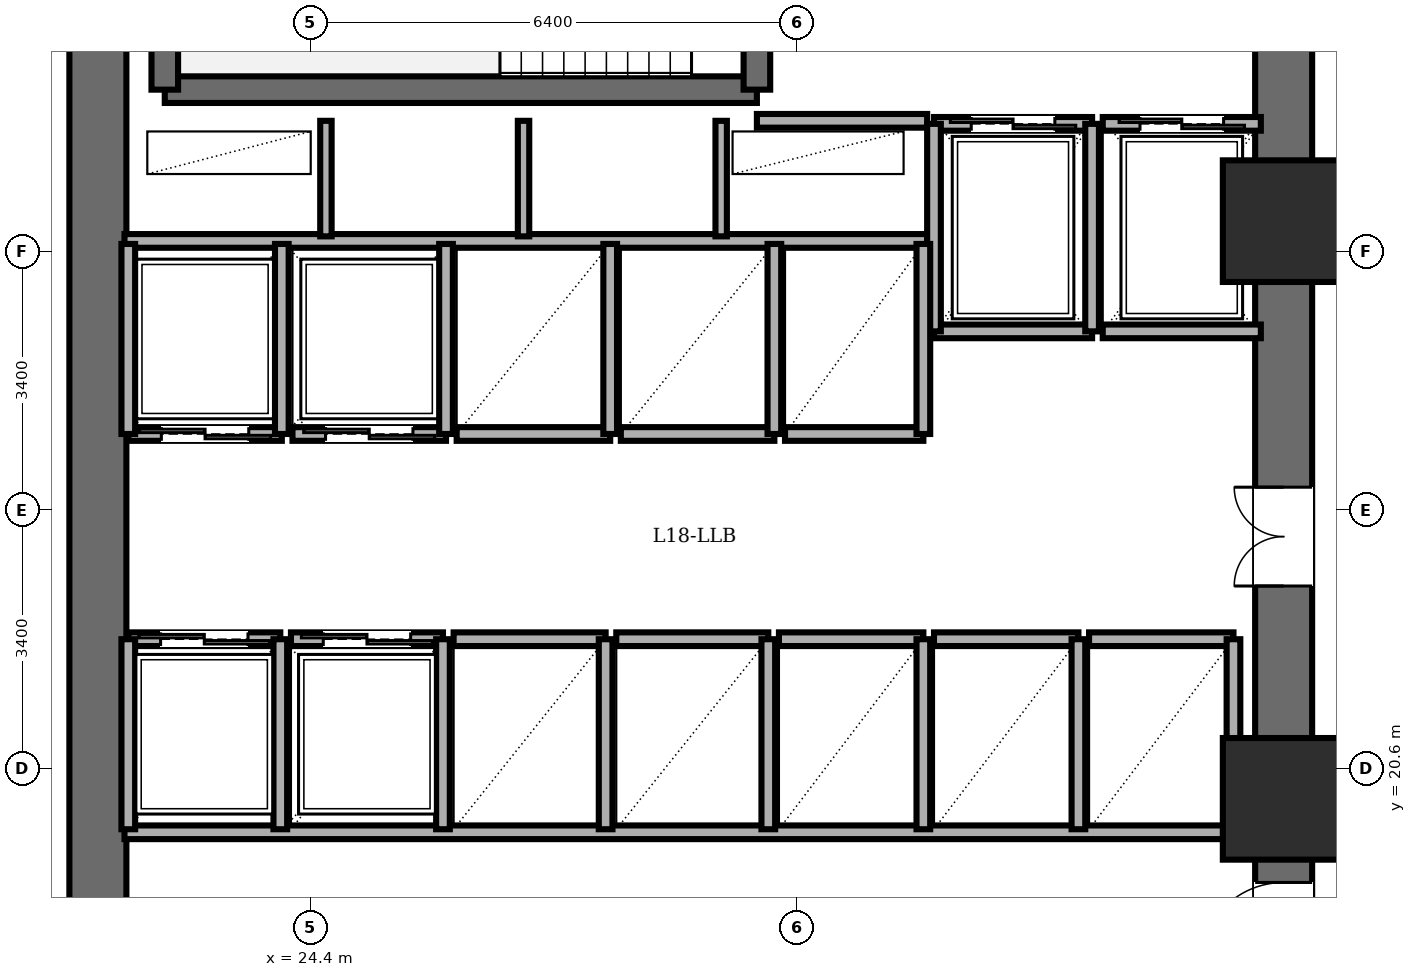
"""IFC4 building model, lengths in metres.
Left out: names, types, materials, properties, quantities, classifications, styles, units other than length and angle.
Written with IfcOpenShell. Run it as: python <this file> out.ifc"""

import sys

from ifc_helpers import new_model, si_unit, direction, frame, frame_2d, origin, origin_2d, place, context, subcontext, project, spatial, rectangle, extrude, element, fill, save


model = new_model("IFC4")
c1 = context("Model", 3, precision=1e-05, world=origin(), true_north=direction((0.0, 1.0)))
c2 = subcontext(c1, "Body", "Model", "MODEL_VIEW")
j1 = project(units=[si_unit("LENGTHUNIT", "METRE"), si_unit("PLANEANGLEUNIT", "RADIAN")], contexts=[c1])
p1 = place(None, origin())
s1 = spatial("IfcSite", under=j1, at=p1, CompositionType="ELEMENT")
p2 = place(p1, origin())
s2 = spatial("IfcBuilding", under=s1, at=p2, CompositionType="ELEMENT")
p3 = place(p2, frame((0.0, 0.0, 68.4)))
s3 = spatial("IfcBuildingStorey", under=s2, at=p3, CompositionType="ELEMENT", Elevation=68.4)
for number, where, z_axis, x_axis in (
    (1, (37.2, 20.2, 0.0), (0.0, 0.0, 1.0), (1.0, 0.0, 0.0)),
    (2, (37.2, 27.8, 0.0), (0.0, 0.0, 1.0), (1.0, 0.0, 0.0)),
):
    element("IfcColumn", number, at=place(p3, frame(where, z_axis=z_axis, x_axis=x_axis)), inside=s3, PredefinedType="COLUMN", context=c2, shape_type="SweptSolid", body=[
        extrude(rectangle(XDim=1.6, YDim=1.6, at=origin_2d()), origin(), (0.0, 0.0, 1.0), 3.6),
    ])
p4 = place(p3, frame((21.6, 14.4, 0.0), z_axis=(0.0, 0.0, 1.0), x_axis=(0.0, 1.0, 0.0)))
e3 = element("IfcWall", 3, at=p4, inside=s3, PredefinedType="SHEAR", context=c2, shape_type="SweptSolid", body=[
    extrude(rectangle(XDim=19.2, YDim=0.75, at=frame_2d((9.6, 0.0))), origin(), (0.0, 0.0, 1.0), 3.4),
])
p5 = place(p3, frame((37.2, 14.4, 0.0), z_axis=(0.0, 0.0, 1.0), x_axis=(0.0, 1.0, 0.0)))
e4 = element("IfcWall", 4, at=p5, inside=s3, PredefinedType="SHEAR", context=c2, shape_type="SweptSolid", body=[
    extrude(rectangle(XDim=19.2, YDim=0.75, at=frame_2d((9.6, 0.0))), origin(), (0.0, 0.0, 1.0), 3.4),
])
p6 = place(p5, frame((15.8, 0.0, 0.0)))
e5 = element("IfcOpeningElement", 5, at=p6, cuts=e4, PredefinedType="OPENING", context=c2, shape_type="SweptSolid", body=[
    extrude(rectangle(XDim=1.15, YDim=2.15, at=frame_2d((0.575, 1.075))), frame((0.0, 0.385, 0.0), z_axis=(0.0, -1.0, 0.0), x_axis=(1.0, 0.0, 0.0)), (0.0, 0.0, 1.0), 0.77),
])
p7 = place(p5, frame((3.6, 0.0, 0.0)))
e6 = element("IfcOpeningElement", 6, at=p7, cuts=e4, PredefinedType="OPENING", context=c2, shape_type="SweptSolid", body=[
    extrude(rectangle(XDim=1.1, YDim=2.15, at=frame_2d((0.55, 1.075))), frame((0.0, 0.385, 0.0), z_axis=(0.0, -1.0, 0.0), x_axis=(1.0, 0.0, 0.0)), (0.0, 0.0, 1.0), 0.77),
])
p8 = place(p5, frame((8.6, 0.0, 0.0)))
e7 = element("IfcOpeningElement", 7, at=p8, cuts=e4, PredefinedType="OPENING", context=c2, shape_type="SweptSolid", body=[
    extrude(rectangle(XDim=1.3, YDim=2.2, at=frame_2d((0.65, 1.1))), frame((0.0, 0.385, 0.0), z_axis=(0.0, -1.0, 0.0), x_axis=(1.0, 0.0, 0.0)), (0.0, 0.0, 1.0), 0.77),
])
p9 = place(p3, frame((22.48, 29.53, 0.0), z_axis=(0.0, 0.0, 1.0), x_axis=(1.0, 0.0, 0.0)))
e8 = element("IfcWall", 8, at=p9, inside=s3, PredefinedType="SOLIDWALL", context=c2, shape_type="SweptSolid", body=[
    extrude(rectangle(XDim=7.79, YDim=0.35, at=frame_2d((3.895, 0.0))), origin(), (0.0, 0.0, 1.0), 3.4),
])
p10 = place(p3, frame((22.48, 29.53, 0.0), z_axis=(0.0, 0.0, 1.0), x_axis=(0.0, 1.0, 0.0)))
e9 = element("IfcWall", 9, at=p10, inside=s3, PredefinedType="SOLIDWALL", context=c2, shape_type="SweptSolid", body=[
    extrude(rectangle(XDim=3.58, YDim=0.35, at=frame_2d((1.79, 0.0))), origin(), (0.0, 0.0, 1.0), 3.4),
])
p11 = place(p3, frame((30.27, 29.53, 0.0), z_axis=(0.0, 0.0, 1.0), x_axis=(0.0, 1.0, 0.0)))
e10 = element("IfcWall", 10, at=p11, inside=s3, PredefinedType="SOLIDWALL", context=c2, shape_type="SweptSolid", body=[
    extrude(rectangle(XDim=3.58, YDim=0.35, at=frame_2d((1.79, 0.0))), origin(), (0.0, 0.0, 1.0), 3.4),
])
p12 = place(p11, frame((1.25, 0.0, 0.0)))
e11 = element("IfcOpeningElement", 11, at=p12, cuts=e10, PredefinedType="OPENING", context=c2, shape_type="SweptSolid", body=[
    extrude(rectangle(XDim=1.1, YDim=2.15, at=frame_2d((0.55, 1.075))), frame((0.0, 0.185, 0.0), z_axis=(0.0, -1.0, 0.0), x_axis=(1.0, 0.0, 0.0)), (0.0, 0.0, 1.0), 0.37),
])
p13 = place(p3, frame((30.27, 29.12, 0.0), z_axis=(0.0, 0.0, 1.0), x_axis=(1.0, 0.0, 0.0)))
e12 = element("IfcWall", 12, at=p13, inside=s3, PredefinedType="PARTITIONING", context=c2, shape_type="SweptSolid", body=[
    extrude(rectangle(XDim=2.24, YDim=0.18, at=frame_2d((1.12, 0.0))), origin(), (0.0, 0.0, 1.0), 3.4),
])
p14 = place(p3, frame((21.95, 27.54, 0.0), z_axis=(0.0, 0.0, 1.0), x_axis=(1.0, 0.0, 0.0)))
e13 = element("IfcWall", 13, at=p14, inside=s3, PredefinedType="PARTITIONING", context=c2, shape_type="SweptSolid", body=[
    extrude(rectangle(XDim=10.56, YDim=0.18, at=frame_2d((5.28, 0.0))), origin(), (0.0, 0.0, 1.0), 3.4),
])
for number, where, z_axis, x_axis in (
    (14, (24.6, 27.6, 0.0), (0.0, 0.0, 1.0), (0.0, 1.0, 0.0)),
    (15, (27.2, 27.6, 0.0), (0.0, 0.0, 1.0), (0.0, 1.0, 0.0)),
    (16, (29.8, 27.6, 0.0), (0.0, 0.0, 1.0), (0.0, 1.0, 0.0)),
):
    element("IfcWall", number, at=place(p3, frame(where, z_axis=z_axis, x_axis=x_axis)), inside=s3, PredefinedType="PARTITIONING", context=c2, shape_type="SweptSolid", body=[
        extrude(rectangle(XDim=1.52, YDim=0.15, at=frame_2d((0.76, 0.0))), origin(), (0.0, 0.0, 1.0), 3.4),
    ])
p15 = place(p3, frame((21.95, 19.76, 0.0), z_axis=(0.0, 0.0, 1.0), x_axis=(1.0, 0.0, 0.0)))
e17 = element("IfcWall", 17, at=p15, inside=s3, PredefinedType="PARTITIONING", context=c2, shape_type="SweptSolid", body=[
    extrude(rectangle(XDim=14.87, YDim=0.18, at=frame_2d((7.435, 0.0))), origin(), (0.0, 0.0, 1.0), 3.4),
])
p16 = place(p3, frame((32.6, 29.08, 0.0), z_axis=(0.0, 0.0, 1.0), x_axis=(1.0, 0.0, 0.0)))
e18 = element("IfcWall", 18, at=p16, inside=s3, PredefinedType="PARTITIONING", context=c2, shape_type="SweptSolid", body=[
    extrude(rectangle(XDim=2.08, YDim=0.18, at=frame_2d((1.04, 0.0))), origin(), (0.0, 0.0, 1.0), 3.4),
])
p17 = place(p16, frame((0.49, 0.0, 0.0)))
e19 = element("IfcOpeningElement", 19, at=p17, cuts=e18, PredefinedType="OPENING", context=c2, shape_type="SweptSolid", body=[
    extrude(rectangle(XDim=1.1, YDim=2.2, at=frame_2d((0.55, 1.1))), frame((0.0, 0.1, 0.0), z_axis=(0.0, -1.0, 0.0), x_axis=(1.0, 0.0, 0.0)), (0.0, 0.0, 1.0), 0.2),
])
p18 = place(p3, frame((34.68, 26.35, 0.0), z_axis=(0.0, 0.0, 1.0), x_axis=(-1.0, 0.0, 0.0)))
e20 = element("IfcWall", 20, at=p18, inside=s3, PredefinedType="PARTITIONING", context=c2, shape_type="SweptSolid", body=[
    extrude(rectangle(XDim=2.08, YDim=0.18, at=frame_2d((1.04, 0.0))), origin(), (0.0, 0.0, 1.0), 3.4),
])
for number, where, z_axis, x_axis in (
    (21, (34.68, 26.35, 0.0), (0.0, 0.0, 1.0), (0.0, 1.0, 0.0)),
    (22, (32.6, 29.08, 0.0), (0.0, 0.0, 1.0), (0.0, -1.0, 0.0)),
):
    element("IfcWall", number, at=place(p3, frame(where, z_axis=z_axis, x_axis=x_axis)), inside=s3, PredefinedType="PARTITIONING", context=c2, shape_type="SweptSolid", body=[
        extrude(rectangle(XDim=2.73, YDim=0.18, at=frame_2d((1.365, 0.0))), origin(), (0.0, 0.0, 1.0), 3.4),
    ])
p19 = place(p3, frame((34.82, 29.08, 0.0), z_axis=(0.0, 0.0, 1.0), x_axis=(1.0, 0.0, 0.0)))
e23 = element("IfcWall", 23, at=p19, inside=s3, PredefinedType="PARTITIONING", context=c2, shape_type="SweptSolid", body=[
    extrude(rectangle(XDim=2.08, YDim=0.18, at=frame_2d((1.04, 0.0))), origin(), (0.0, 0.0, 1.0), 3.4),
])
p20 = place(p19, frame((0.49, 0.0, 0.0)))
e24 = element("IfcOpeningElement", 24, at=p20, cuts=e23, PredefinedType="OPENING", context=c2, shape_type="SweptSolid", body=[
    extrude(rectangle(XDim=1.1, YDim=2.2, at=frame_2d((0.55, 1.1))), frame((0.0, 0.1, 0.0), z_axis=(0.0, -1.0, 0.0), x_axis=(1.0, 0.0, 0.0)), (0.0, 0.0, 1.0), 0.2),
])
p21 = place(p3, frame((36.9, 26.35, 0.0), z_axis=(0.0, 0.0, 1.0), x_axis=(-1.0, 0.0, 0.0)))
e25 = element("IfcWall", 25, at=p21, inside=s3, PredefinedType="PARTITIONING", context=c2, shape_type="SweptSolid", body=[
    extrude(rectangle(XDim=2.08, YDim=0.18, at=frame_2d((1.04, 0.0))), origin(), (0.0, 0.0, 1.0), 3.4),
])
p22 = place(p3, frame((24.02, 25.0, 0.0), z_axis=(0.0, 0.0, 1.0), x_axis=(-1.0, 0.0, 0.0)))
e26 = element("IfcWall", 26, at=p22, inside=s3, PredefinedType="PARTITIONING", context=c2, shape_type="SweptSolid", body=[
    extrude(rectangle(XDim=2.02, YDim=0.18, at=frame_2d((1.01, 0.0))), origin(), (0.0, 0.0, 1.0), 3.4),
])
p23 = place(p22, frame((0.435, 0.0, 0.0)))
e27 = element("IfcOpeningElement", 27, at=p23, cuts=e26, PredefinedType="OPENING", context=c2, shape_type="SweptSolid", body=[
    extrude(rectangle(XDim=1.15, YDim=2.2, at=frame_2d((0.575, 1.1))), frame((0.0, 0.1, 0.0), z_axis=(0.0, -1.0, 0.0), x_axis=(1.0, 0.0, 0.0)), (0.0, 0.0, 1.0), 0.2),
])
for number, where, z_axis, x_axis in (
    (28, (24.02, 25.0, 0.0), (0.0, 0.0, 1.0), (0.0, 1.0, 0.0)),
    (29, (22.0, 27.5, 0.0), (0.0, 0.0, 1.0), (0.0, -1.0, 0.0)),
):
    element("IfcWall", number, at=place(p3, frame(where, z_axis=z_axis, x_axis=x_axis)), inside=s3, PredefinedType="PARTITIONING", context=c2, shape_type="SweptSolid", body=[
        extrude(rectangle(XDim=2.5, YDim=0.18, at=frame_2d((1.25, 0.0))), origin(), (0.0, 0.0, 1.0), 3.4),
    ])
p24 = place(p3, frame((26.18, 25.0, 0.0), z_axis=(0.0, 0.0, 1.0), x_axis=(-1.0, 0.0, 0.0)))
e30 = element("IfcWall", 30, at=p24, inside=s3, PredefinedType="PARTITIONING", context=c2, shape_type="SweptSolid", body=[
    extrude(rectangle(XDim=2.02, YDim=0.18, at=frame_2d((1.01, 0.0))), origin(), (0.0, 0.0, 1.0), 3.4),
])
p25 = place(p24, frame((0.435, 0.0, 0.0)))
e31 = element("IfcOpeningElement", 31, at=p25, cuts=e30, PredefinedType="OPENING", context=c2, shape_type="SweptSolid", body=[
    extrude(rectangle(XDim=1.15, YDim=2.2, at=frame_2d((0.575, 1.1))), frame((0.0, 0.1, 0.0), z_axis=(0.0, -1.0, 0.0), x_axis=(1.0, 0.0, 0.0)), (0.0, 0.0, 1.0), 0.2),
])
p26 = place(p3, frame((26.18, 25.0, 0.0), z_axis=(0.0, 0.0, 1.0), x_axis=(0.0, 1.0, 0.0)))
e32 = element("IfcWall", 32, at=p26, inside=s3, PredefinedType="PARTITIONING", context=c2, shape_type="SweptSolid", body=[
    extrude(rectangle(XDim=2.5, YDim=0.18, at=frame_2d((1.25, 0.0))), origin(), (0.0, 0.0, 1.0), 3.4),
])
p27 = place(p3, frame((22.0, 22.3, 0.0), z_axis=(0.0, 0.0, 1.0), x_axis=(1.0, 0.0, 0.0)))
e33 = element("IfcWall", 33, at=p27, inside=s3, PredefinedType="PARTITIONING", context=c2, shape_type="SweptSolid", body=[
    extrude(rectangle(XDim=2.0, YDim=0.18, at=frame_2d((1.0, 0.0))), origin(), (0.0, 0.0, 1.0), 3.4),
])
p28 = place(p27, frame((0.425, 0.0, 0.0)))
e34 = element("IfcOpeningElement", 34, at=p28, cuts=e33, PredefinedType="OPENING", context=c2, shape_type="SweptSolid", body=[
    extrude(rectangle(XDim=1.15, YDim=2.2, at=frame_2d((0.575, 1.1))), frame((0.0, 0.1, 0.0), z_axis=(0.0, -1.0, 0.0), x_axis=(1.0, 0.0, 0.0)), (0.0, 0.0, 1.0), 0.2),
])
for number, where, z_axis, x_axis in (
    (35, (24.0, 19.8, 0.0), (0.0, 0.0, 1.0), (0.0, 1.0, 0.0)),
    (36, (22.0, 22.3, 0.0), (0.0, 0.0, 1.0), (0.0, -1.0, 0.0)),
):
    element("IfcWall", number, at=place(p3, frame(where, z_axis=z_axis, x_axis=x_axis)), inside=s3, PredefinedType="PARTITIONING", context=c2, shape_type="SweptSolid", body=[
        extrude(rectangle(XDim=2.5, YDim=0.18, at=frame_2d((1.25, 0.0))), origin(), (0.0, 0.0, 1.0), 3.4),
    ])
p29 = place(p3, frame((24.14, 22.3, 0.0), z_axis=(0.0, 0.0, 1.0), x_axis=(1.0, 0.0, 0.0)))
e37 = element("IfcWall", 37, at=p29, inside=s3, PredefinedType="PARTITIONING", context=c2, shape_type="SweptSolid", body=[
    extrude(rectangle(XDim=2.0, YDim=0.18, at=frame_2d((1.0, 0.0))), origin(), (0.0, 0.0, 1.0), 3.4),
])
p30 = place(p29, frame((0.425, 0.0, 0.0)))
e38 = element("IfcOpeningElement", 38, at=p30, cuts=e37, PredefinedType="OPENING", context=c2, shape_type="SweptSolid", body=[
    extrude(rectangle(XDim=1.15, YDim=2.2, at=frame_2d((0.575, 1.1))), frame((0.0, 0.1, 0.0), z_axis=(0.0, -1.0, 0.0), x_axis=(1.0, 0.0, 0.0)), (0.0, 0.0, 1.0), 0.2),
])
p31 = place(p3, frame((26.14, 19.8, 0.0), z_axis=(0.0, 0.0, 1.0), x_axis=(0.0, 1.0, 0.0)))
e39 = element("IfcWall", 39, at=p31, inside=s3, PredefinedType="PARTITIONING", context=c2, shape_type="SweptSolid", body=[
    extrude(rectangle(XDim=2.5, YDim=0.18, at=frame_2d((1.25, 0.0))), origin(), (0.0, 0.0, 1.0), 3.4),
])
p32 = place(p3, frame((28.34, 25.0, 0.0), z_axis=(0.0, 0.0, 1.0), x_axis=(-1.0, 0.0, 0.0)))
e40 = element("IfcWall", 40, at=p32, inside=s3, PredefinedType="PARTITIONING", context=c2, shape_type="SweptSolid", body=[
    extrude(rectangle(XDim=2.02, YDim=0.18, at=frame_2d((1.01, 0.0))), origin(), (0.0, 0.0, 1.0), 3.4),
])
p33 = place(p3, frame((28.34, 25.0, 0.0), z_axis=(0.0, 0.0, 1.0), x_axis=(0.0, 1.0, 0.0)))
e41 = element("IfcWall", 41, at=p33, inside=s3, PredefinedType="PARTITIONING", context=c2, shape_type="SweptSolid", body=[
    extrude(rectangle(XDim=2.5, YDim=0.18, at=frame_2d((1.25, 0.0))), origin(), (0.0, 0.0, 1.0), 3.4),
])
p34 = place(p3, frame((30.5, 25.0, 0.0), z_axis=(0.0, 0.0, 1.0), x_axis=(-1.0, 0.0, 0.0)))
e42 = element("IfcWall", 42, at=p34, inside=s3, PredefinedType="PARTITIONING", context=c2, shape_type="SweptSolid", body=[
    extrude(rectangle(XDim=2.02, YDim=0.18, at=frame_2d((1.01, 0.0))), origin(), (0.0, 0.0, 1.0), 3.4),
])
p35 = place(p3, frame((30.5, 25.0, 0.0), z_axis=(0.0, 0.0, 1.0), x_axis=(0.0, 1.0, 0.0)))
e43 = element("IfcWall", 43, at=p35, inside=s3, PredefinedType="PARTITIONING", context=c2, shape_type="SweptSolid", body=[
    extrude(rectangle(XDim=2.5, YDim=0.18, at=frame_2d((1.25, 0.0))), origin(), (0.0, 0.0, 1.0), 3.4),
])
p36 = place(p3, frame((26.28, 22.3, 0.0), z_axis=(0.0, 0.0, 1.0), x_axis=(1.0, 0.0, 0.0)))
e44 = element("IfcWall", 44, at=p36, inside=s3, PredefinedType="PARTITIONING", context=c2, shape_type="SweptSolid", body=[
    extrude(rectangle(XDim=2.0, YDim=0.18, at=frame_2d((1.0, 0.0))), origin(), (0.0, 0.0, 1.0), 3.4),
])
p37 = place(p3, frame((28.28, 19.8, 0.0), z_axis=(0.0, 0.0, 1.0), x_axis=(0.0, 1.0, 0.0)))
e45 = element("IfcWall", 45, at=p37, inside=s3, PredefinedType="PARTITIONING", context=c2, shape_type="SweptSolid", body=[
    extrude(rectangle(XDim=2.5, YDim=0.18, at=frame_2d((1.25, 0.0))), origin(), (0.0, 0.0, 1.0), 3.4),
])
p38 = place(p3, frame((28.42, 22.3, 0.0), z_axis=(0.0, 0.0, 1.0), x_axis=(1.0, 0.0, 0.0)))
e46 = element("IfcWall", 46, at=p38, inside=s3, PredefinedType="PARTITIONING", context=c2, shape_type="SweptSolid", body=[
    extrude(rectangle(XDim=2.0, YDim=0.18, at=frame_2d((1.0, 0.0))), origin(), (0.0, 0.0, 1.0), 3.4),
])
p39 = place(p3, frame((30.42, 19.8, 0.0), z_axis=(0.0, 0.0, 1.0), x_axis=(0.0, 1.0, 0.0)))
e47 = element("IfcWall", 47, at=p39, inside=s3, PredefinedType="PARTITIONING", context=c2, shape_type="SweptSolid", body=[
    extrude(rectangle(XDim=2.5, YDim=0.18, at=frame_2d((1.25, 0.0))), origin(), (0.0, 0.0, 1.0), 3.4),
])
p40 = place(p3, frame((32.46, 25.0, 0.0), z_axis=(0.0, 0.0, 1.0), x_axis=(-1.0, 0.0, 0.0)))
e48 = element("IfcWall", 48, at=p40, inside=s3, PredefinedType="PARTITIONING", context=c2, shape_type="SweptSolid", body=[
    extrude(rectangle(XDim=1.82, YDim=0.18, at=frame_2d((0.91, 0.0))), origin(), (0.0, 0.0, 1.0), 3.4),
])
p41 = place(p3, frame((32.46, 25.0, 0.0), z_axis=(0.0, 0.0, 1.0), x_axis=(0.0, 1.0, 0.0)))
e49 = element("IfcWall", 49, at=p41, inside=s3, PredefinedType="PARTITIONING", context=c2, shape_type="SweptSolid", body=[
    extrude(rectangle(XDim=2.5, YDim=0.18, at=frame_2d((1.25, 0.0))), origin(), (0.0, 0.0, 1.0), 3.4),
])
p42 = place(p3, frame((30.56, 22.3, 0.0), z_axis=(0.0, 0.0, 1.0), x_axis=(1.0, 0.0, 0.0)))
e50 = element("IfcWall", 50, at=p42, inside=s3, PredefinedType="PARTITIONING", context=c2, shape_type="SweptSolid", body=[
    extrude(rectangle(XDim=1.9, YDim=0.18, at=frame_2d((0.95, 0.0))), origin(), (0.0, 0.0, 1.0), 3.4),
])
p43 = place(p3, frame((32.46, 19.8, 0.0), z_axis=(0.0, 0.0, 1.0), x_axis=(0.0, 1.0, 0.0)))
e51 = element("IfcWall", 51, at=p43, inside=s3, PredefinedType="PARTITIONING", context=c2, shape_type="SweptSolid", body=[
    extrude(rectangle(XDim=2.5, YDim=0.18, at=frame_2d((1.25, 0.0))), origin(), (0.0, 0.0, 1.0), 3.4),
])
p44 = place(p3, frame((32.6, 22.3, 0.0), z_axis=(0.0, 0.0, 1.0), x_axis=(1.0, 0.0, 0.0)))
e52 = element("IfcWall", 52, at=p44, inside=s3, PredefinedType="PARTITIONING", context=c2, shape_type="SweptSolid", body=[
    extrude(rectangle(XDim=1.9, YDim=0.18, at=frame_2d((0.95, 0.0))), origin(), (0.0, 0.0, 1.0), 3.4),
])
p45 = place(p3, frame((34.5, 19.8, 0.0), z_axis=(0.0, 0.0, 1.0), x_axis=(0.0, 1.0, 0.0)))
e53 = element("IfcWall", 53, at=p45, inside=s3, PredefinedType="PARTITIONING", context=c2, shape_type="SweptSolid", body=[
    extrude(rectangle(XDim=2.5, YDim=0.18, at=frame_2d((1.25, 0.0))), origin(), (0.0, 0.0, 1.0), 3.4),
])
p46 = place(p3, frame((34.64, 22.3, 0.0), z_axis=(0.0, 0.0, 1.0), x_axis=(1.0, 0.0, 0.0)))
e54 = element("IfcWall", 54, at=p46, inside=s3, PredefinedType="PARTITIONING", context=c2, shape_type="SweptSolid", body=[
    extrude(rectangle(XDim=1.9, YDim=0.18, at=frame_2d((0.95, 0.0))), origin(), (0.0, 0.0, 1.0), 3.4),
])
p47 = place(p3, frame((36.54, 19.8, 0.0), z_axis=(0.0, 0.0, 1.0), x_axis=(0.0, 1.0, 0.0)))
e55 = element("IfcWall", 55, at=p47, inside=s3, PredefinedType="PARTITIONING", context=c2, shape_type="SweptSolid", body=[
    extrude(rectangle(XDim=2.5, YDim=0.18, at=frame_2d((1.25, 0.0))), origin(), (0.0, 0.0, 1.0), 3.4),
])
p48 = place(p7, origin())
e56 = element("IfcDoor", 56, at=p48, inside=s3, OperationType="SINGLE_SWING_LEFT", PredefinedType="DOOR", context=c2, shape_type="SweptSolid", body=[
    extrude(rectangle(XDim=1.1, YDim=2.15, at=frame_2d((0.55, 1.075))), frame((0.0, 0.025, 0.0), z_axis=(0.0, -1.0, 0.0), x_axis=(1.0, 0.0, 0.0)), (0.0, 0.0, 1.0), 0.05),
])
fill(e6, e56)
p49 = place(p17, origin())
e57 = element("IfcDoor", 57, at=p49, inside=s3, OperationType="DOUBLE_DOOR_SLIDING", PredefinedType="DOOR", context=c2, shape_type="SweptSolid", body=[
    extrude(rectangle(XDim=1.1, YDim=2.2, at=frame_2d((0.55, 1.1))), frame((0.0, 0.025, 0.0), z_axis=(0.0, -1.0, 0.0), x_axis=(1.0, 0.0, 0.0)), (0.0, 0.0, 1.0), 0.05),
])
fill(e19, e57)
p50 = place(p20, origin())
e58 = element("IfcDoor", 58, at=p50, inside=s3, OperationType="DOUBLE_DOOR_SLIDING", PredefinedType="DOOR", context=c2, shape_type="SweptSolid", body=[
    extrude(rectangle(XDim=1.1, YDim=2.2, at=frame_2d((0.55, 1.1))), frame((0.0, 0.025, 0.0), z_axis=(0.0, -1.0, 0.0), x_axis=(1.0, 0.0, 0.0)), (0.0, 0.0, 1.0), 0.05),
])
fill(e24, e58)
p51 = place(p23, origin())
e59 = element("IfcDoor", 59, at=p51, inside=s3, OperationType="DOUBLE_DOOR_SLIDING", PredefinedType="DOOR", context=c2, shape_type="SweptSolid", body=[
    extrude(rectangle(XDim=1.15, YDim=2.2, at=frame_2d((0.575, 1.1))), frame((0.0, 0.025, 0.0), z_axis=(0.0, -1.0, 0.0), x_axis=(1.0, 0.0, 0.0)), (0.0, 0.0, 1.0), 0.05),
])
fill(e27, e59)
p52 = place(p25, origin())
e60 = element("IfcDoor", 60, at=p52, inside=s3, OperationType="DOUBLE_DOOR_SLIDING", PredefinedType="DOOR", context=c2, shape_type="SweptSolid", body=[
    extrude(rectangle(XDim=1.15, YDim=2.2, at=frame_2d((0.575, 1.1))), frame((0.0, 0.025, 0.0), z_axis=(0.0, -1.0, 0.0), x_axis=(1.0, 0.0, 0.0)), (0.0, 0.0, 1.0), 0.05),
])
fill(e31, e60)
p53 = place(p28, origin())
e61 = element("IfcDoor", 61, at=p53, inside=s3, OperationType="DOUBLE_DOOR_SLIDING", PredefinedType="DOOR", context=c2, shape_type="SweptSolid", body=[
    extrude(rectangle(XDim=1.15, YDim=2.2, at=frame_2d((0.575, 1.1))), frame((0.0, 0.025, 0.0), z_axis=(0.0, -1.0, 0.0), x_axis=(1.0, 0.0, 0.0)), (0.0, 0.0, 1.0), 0.05),
])
fill(e34, e61)
p54 = place(p30, origin())
e62 = element("IfcDoor", 62, at=p54, inside=s3, OperationType="DOUBLE_DOOR_SLIDING", PredefinedType="DOOR", context=c2, shape_type="SweptSolid", body=[
    extrude(rectangle(XDim=1.15, YDim=2.2, at=frame_2d((0.575, 1.1))), frame((0.0, 0.025, 0.0), z_axis=(0.0, -1.0, 0.0), x_axis=(1.0, 0.0, 0.0)), (0.0, 0.0, 1.0), 0.05),
])
fill(e38, e62)
p55 = place(p8, origin())
e63 = element("IfcDoor", 63, at=p55, inside=s3, OperationType="DOUBLE_DOOR_SINGLE_SWING", PredefinedType="DOOR", context=c2, shape_type="SweptSolid", body=[
    extrude(rectangle(XDim=1.3, YDim=2.2, at=frame_2d((0.65, 1.1))), frame((0.0, 0.025, 0.0), z_axis=(0.0, -1.0, 0.0), x_axis=(1.0, 0.0, 0.0)), (0.0, 0.0, 1.0), 0.05),
])
fill(e7, e63)
save(model, sys.argv[1])
